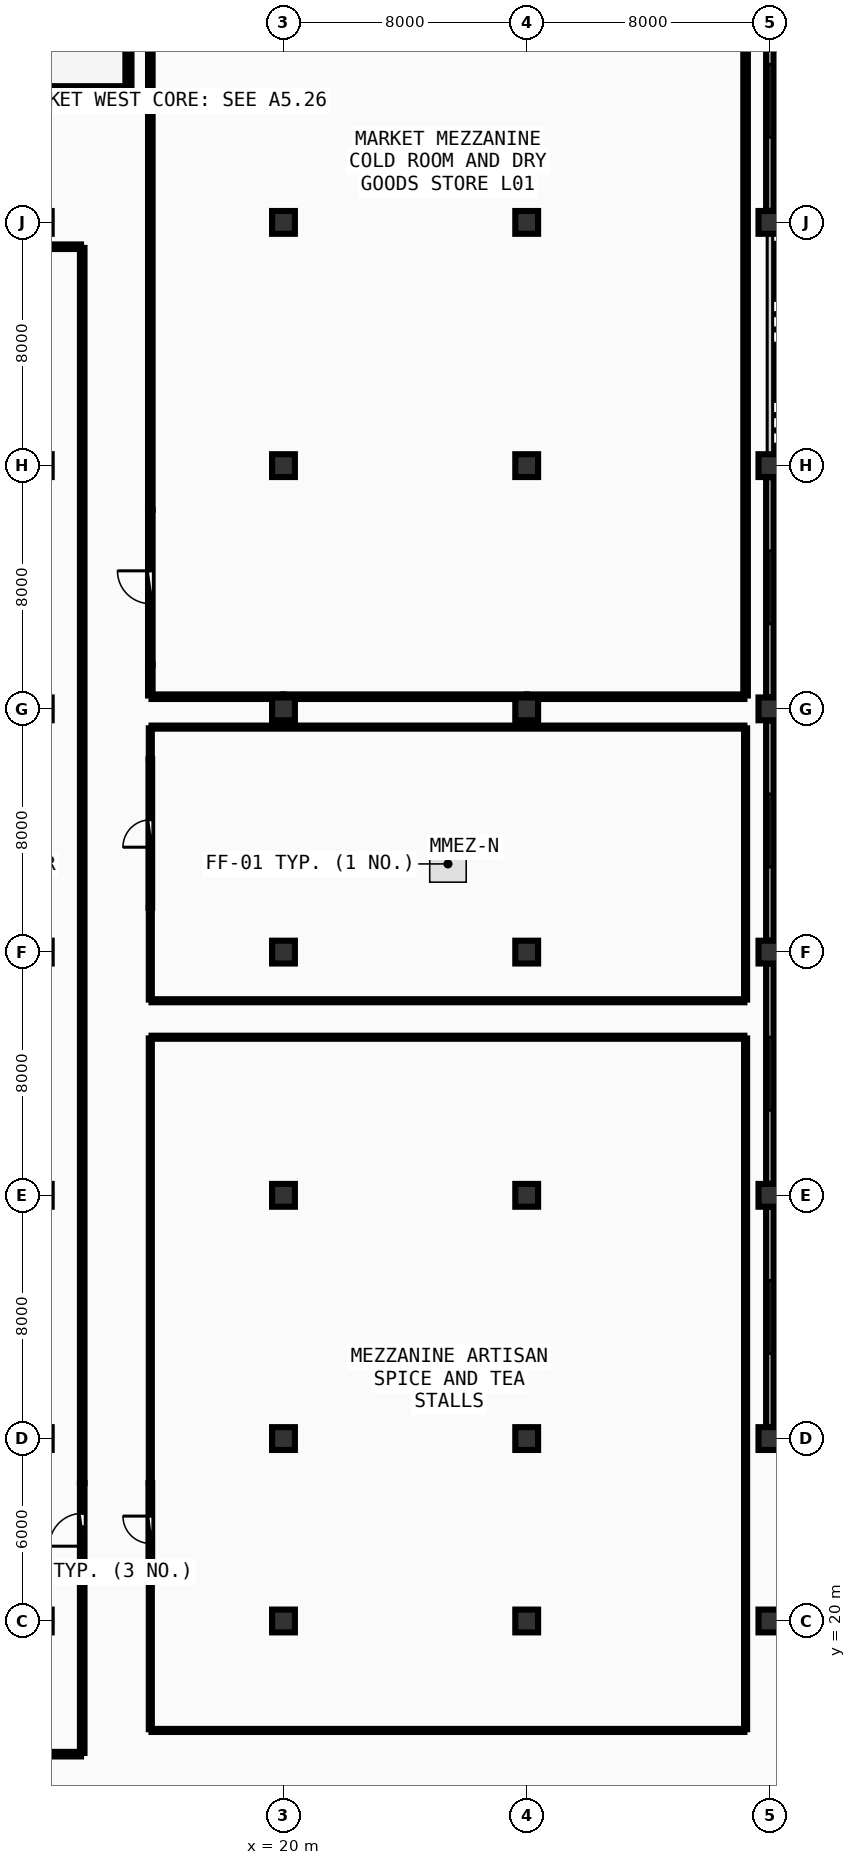
"""IFC4 building model, lengths in metres.
Left out: names, types, materials, properties, quantities, classifications, styles, units other than length and angle.
Written with IfcOpenShell. Run it as: python <this file> out.ifc"""

import sys

from ifc_helpers import new_model, si_unit, direction, frame, frame_2d, origin, origin_2d, place, context, subcontext, project, spatial, rectangle, extrude, element, fill, save


model = new_model("IFC4")
c1 = context("Model", 3, precision=1e-05, world=origin(), true_north=direction((0.0, 1.0)))
c2 = subcontext(c1, "Body", "Model", "MODEL_VIEW")
j1 = project(units=[si_unit("LENGTHUNIT", "METRE"), si_unit("PLANEANGLEUNIT", "RADIAN")], contexts=[c1])
p1 = place(None, origin())
s1 = spatial("IfcSite", under=j1, at=p1, CompositionType="ELEMENT")
p2 = place(p1, origin())
s2 = spatial("IfcBuilding", under=s1, at=p2, CompositionType="ELEMENT")
p3 = place(p2, frame((0.0, 0.0, 4.5)))
s3 = spatial("IfcBuildingStorey", under=s2, at=p3, CompositionType="ELEMENT", Elevation=4.5)
for number, where, z_axis, x_axis in (
    (1, (20.0, 20.0, 0.0), (0.0, 0.0, 1.0), (1.0, 0.0, 0.0)),
    (2, (20.0, 26.0, 0.0), (0.0, 0.0, 1.0), (1.0, 0.0, 0.0)),
    (3, (20.0, 34.0, 0.0), (0.0, 0.0, 1.0), (1.0, 0.0, 0.0)),
    (4, (20.0, 42.0, 0.0), (0.0, 0.0, 1.0), (1.0, 0.0, 0.0)),
    (5, (20.0, 50.0, 0.0), (0.0, 0.0, 1.0), (1.0, 0.0, 0.0)),
    (6, (20.0, 58.0, 0.0), (0.0, 0.0, 1.0), (1.0, 0.0, 0.0)),
    (7, (20.0, 66.0, 0.0), (0.0, 0.0, 1.0), (1.0, 0.0, 0.0)),
    (8, (28.0, 20.0, 0.0), (0.0, 0.0, 1.0), (1.0, 0.0, 0.0)),
    (9, (28.0, 26.0, 0.0), (0.0, 0.0, 1.0), (1.0, 0.0, 0.0)),
    (10, (28.0, 34.0, 0.0), (0.0, 0.0, 1.0), (1.0, 0.0, 0.0)),
    (11, (28.0, 42.0, 0.0), (0.0, 0.0, 1.0), (1.0, 0.0, 0.0)),
    (12, (28.0, 50.0, 0.0), (0.0, 0.0, 1.0), (1.0, 0.0, 0.0)),
    (13, (28.0, 58.0, 0.0), (0.0, 0.0, 1.0), (1.0, 0.0, 0.0)),
    (14, (28.0, 66.0, 0.0), (0.0, 0.0, 1.0), (1.0, 0.0, 0.0)),
    (15, (36.0, 20.0, 0.0), (0.0, 0.0, 1.0), (1.0, 0.0, 0.0)),
    (16, (36.0, 26.0, 0.0), (0.0, 0.0, 1.0), (1.0, 0.0, 0.0)),
    (17, (36.0, 34.0, 0.0), (0.0, 0.0, 1.0), (1.0, 0.0, 0.0)),
    (18, (36.0, 42.0, 0.0), (0.0, 0.0, 1.0), (1.0, 0.0, 0.0)),
    (19, (36.0, 50.0, 0.0), (0.0, 0.0, 1.0), (1.0, 0.0, 0.0)),
    (20, (36.0, 58.0, 0.0), (0.0, 0.0, 1.0), (1.0, 0.0, 0.0)),
    (21, (36.0, 66.0, 0.0), (0.0, 0.0, 1.0), (1.0, 0.0, 0.0)),
):
    element("IfcColumn", number, at=place(p3, frame(where, z_axis=z_axis, x_axis=x_axis)), inside=s3, PredefinedType="COLUMN", context=c2, shape_type="SweptSolid", body=[
        extrude(rectangle(XDim=0.75, YDim=0.75, at=origin_2d()), origin(), (0.0, 0.0, 1.0), 4.5),
    ])
p4 = place(p3, frame((36.0, 26.38, 0.0), z_axis=(0.0, 0.0, 1.0), x_axis=(0.0, 1.0, 0.0)))
e22 = element("IfcWall", 22, at=p4, inside=s3, PredefinedType="SOLIDWALL", context=c2, shape_type="SweptSolid", body=[
    extrude(rectangle(XDim=7.24, YDim=0.25, at=frame_2d((3.62, 0.0))), origin(), (0.0, 0.0, 1.0), 3.42),
])
p5 = place(p4, frame((2.42, 0.0, 0.95)))
e23 = element("IfcOpeningElement", 23, at=p5, cuts=e22, PredefinedType="OPENING", context=c2, shape_type="SweptSolid", body=[
    extrude(rectangle(XDim=2.4, YDim=1.65, at=frame_2d((1.2, 0.825))), frame((0.0, 0.135, 0.0), z_axis=(0.0, -1.0, 0.0), x_axis=(1.0, 0.0, 0.0)), (0.0, 0.0, 1.0), 0.27),
])
p6 = place(p3, frame((36.0, 34.38, 0.0), z_axis=(0.0, 0.0, 1.0), x_axis=(0.0, 1.0, 0.0)))
e24 = element("IfcWall", 24, at=p6, inside=s3, PredefinedType="SOLIDWALL", context=c2, shape_type="SweptSolid", body=[
    extrude(rectangle(XDim=7.24, YDim=0.25, at=frame_2d((3.62, 0.0))), origin(), (0.0, 0.0, 1.0), 3.42),
])
p7 = place(p6, frame((2.42, 0.0, 0.95)))
e25 = element("IfcOpeningElement", 25, at=p7, cuts=e24, PredefinedType="OPENING", context=c2, shape_type="SweptSolid", body=[
    extrude(rectangle(XDim=2.4, YDim=1.65, at=frame_2d((1.2, 0.825))), frame((0.0, 0.135, 0.0), z_axis=(0.0, -1.0, 0.0), x_axis=(1.0, 0.0, 0.0)), (0.0, 0.0, 1.0), 0.27),
])
p8 = place(p3, frame((36.0, 42.38, 0.0), z_axis=(0.0, 0.0, 1.0), x_axis=(0.0, 1.0, 0.0)))
e26 = element("IfcWall", 26, at=p8, inside=s3, PredefinedType="SOLIDWALL", context=c2, shape_type="SweptSolid", body=[
    extrude(rectangle(XDim=7.24, YDim=0.25, at=frame_2d((3.62, 0.0))), origin(), (0.0, 0.0, 1.0), 3.42),
])
p9 = place(p8, frame((2.42, 0.0, 0.95)))
e27 = element("IfcOpeningElement", 27, at=p9, cuts=e26, PredefinedType="OPENING", context=c2, shape_type="SweptSolid", body=[
    extrude(rectangle(XDim=2.4, YDim=1.65, at=frame_2d((1.2, 0.825))), frame((0.0, 0.135, 0.0), z_axis=(0.0, -1.0, 0.0), x_axis=(1.0, 0.0, 0.0)), (0.0, 0.0, 1.0), 0.27),
])
p10 = place(p3, frame((36.0, 50.38, 0.0), z_axis=(0.0, 0.0, 1.0), x_axis=(0.0, 1.0, 0.0)))
e28 = element("IfcWall", 28, at=p10, inside=s3, PredefinedType="SOLIDWALL", context=c2, shape_type="SweptSolid", body=[
    extrude(rectangle(XDim=7.24, YDim=0.25, at=frame_2d((3.62, 0.0))), origin(), (0.0, 0.0, 1.0), 3.42),
])
p11 = place(p10, frame((2.42, 0.0, 0.95)))
e29 = element("IfcOpeningElement", 29, at=p11, cuts=e28, PredefinedType="OPENING", context=c2, shape_type="SweptSolid", body=[
    extrude(rectangle(XDim=2.4, YDim=1.65, at=frame_2d((1.2, 0.825))), frame((0.0, 0.135, 0.0), z_axis=(0.0, -1.0, 0.0), x_axis=(1.0, 0.0, 0.0)), (0.0, 0.0, 1.0), 0.27),
])
p12 = place(p3, frame((36.0, 66.38, 0.0), z_axis=(0.0, 0.0, 1.0), x_axis=(0.0, 1.0, 0.0)))
e30 = element("IfcWall", 30, at=p12, inside=s3, PredefinedType="SOLIDWALL", context=c2, shape_type="SweptSolid", body=[
    extrude(rectangle(XDim=7.24, YDim=0.25, at=frame_2d((3.62, 0.0))), origin(), (0.0, 0.0, 1.0), 3.42),
])
p13 = place(p12, frame((2.42, 0.0, 0.95)))
e31 = element("IfcOpeningElement", 31, at=p13, cuts=e30, PredefinedType="OPENING", context=c2, shape_type="SweptSolid", body=[
    extrude(rectangle(XDim=2.4, YDim=1.65, at=frame_2d((1.2, 0.825))), frame((0.0, 0.135, 0.0), z_axis=(0.0, -1.0, 0.0), x_axis=(1.0, 0.0, 0.0)), (0.0, 0.0, 1.0), 0.27),
])
p14 = place(p3, frame((7.02, 70.38, 0.0), z_axis=(0.0, 0.0, 1.0), x_axis=(1.0, 0.0, 0.0)))
e32 = element("IfcWall", 32, at=p14, inside=s3, PredefinedType="SHEAR", context=c2, shape_type="SweptSolid", body=[
    extrude(rectangle(XDim=7.76, YDim=0.2, at=frame_2d((3.88, 0.0))), origin(), (0.0, 0.0, 1.0), 4.24),
])
p15 = place(p14, frame((0.2, 0.0, 0.0)))
e33 = element("IfcOpeningElement", 33, at=p15, cuts=e32, PredefinedType="OPENING", context=c2, shape_type="SweptSolid", body=[
    extrude(rectangle(XDim=1.05, YDim=2.1, at=frame_2d((0.525, 1.05))), frame((0.0, 0.11, 0.0), z_axis=(0.0, -1.0, 0.0), x_axis=(1.0, 0.0, 0.0)), (0.0, 0.0, 1.0), 0.22),
])
p16 = place(p3, frame((14.9, 70.5, 0.0), z_axis=(0.0, 0.0, 1.0), x_axis=(0.0, 1.0, 0.0)))
e34 = element("IfcWall", 34, at=p16, inside=s3, PredefinedType="SHEAR", context=c2, shape_type="SweptSolid", body=[
    extrude(rectangle(XDim=3.47, YDim=0.2, at=frame_2d((1.735, 0.0))), origin(), (0.0, 0.0, 1.0), 4.24),
])
p17 = place(p3, frame((15.62, 21.46, 0.0), z_axis=(0.0, 0.0, 1.0), x_axis=(0.0, 1.0, 0.0)))
e35 = element("IfcWall", 35, at=p17, inside=s3, PredefinedType="PARTITIONING", context=c2, shape_type="SweptSolid", body=[
    extrude(rectangle(XDim=3.08, YDim=0.12, at=frame_2d((1.54, 0.0))), origin(), (0.0, 0.0, 1.0), 4.19),
])
p18 = place(p17, frame((1.09, 0.0, 0.0)))
e36 = element("IfcOpeningElement", 36, at=p18, cuts=e35, PredefinedType="OPENING", context=c2, shape_type="SweptSolid", body=[
    extrude(rectangle(XDim=0.9, YDim=2.08, at=frame_2d((0.45, 1.04))), frame((0.0, 0.07, 0.0), z_axis=(0.0, -1.0, 0.0), x_axis=(1.0, 0.0, 0.0)), (0.0, 0.0, 1.0), 0.14),
])
p19 = place(p3, frame((15.62, 43.46, 0.0), z_axis=(0.0, 0.0, 1.0), x_axis=(0.0, 1.0, 0.0)))
e37 = element("IfcWall", 37, at=p19, inside=s3, PredefinedType="PARTITIONING", context=c2, shape_type="SweptSolid", body=[
    extrude(rectangle(XDim=4.88, YDim=0.12, at=frame_2d((2.44, 0.0))), origin(), (0.0, 0.0, 1.0), 4.19),
])
p20 = place(p19, frame((1.99, 0.0, 0.0)))
e38 = element("IfcOpeningElement", 38, at=p20, cuts=e37, PredefinedType="OPENING", context=c2, shape_type="SweptSolid", body=[
    extrude(rectangle(XDim=0.9, YDim=2.08, at=frame_2d((0.45, 1.04))), frame((0.0, 0.07, 0.0), z_axis=(0.0, -1.0, 0.0), x_axis=(1.0, 0.0, 0.0)), (0.0, 0.0, 1.0), 0.14),
])
p21 = place(p3, frame((15.62, 51.46, 0.0), z_axis=(0.0, 0.0, 1.0), x_axis=(0.0, 1.0, 0.0)))
e39 = element("IfcWall", 39, at=p21, inside=s3, PredefinedType="PARTITIONING", context=c2, shape_type="SweptSolid", body=[
    extrude(rectangle(XDim=5.08, YDim=0.15, at=frame_2d((2.54, 0.0))), origin(), (0.0, 0.0, 1.0), 4.19),
])
p22 = place(p21, frame((2.0, 0.0, 0.0)))
e40 = element("IfcOpeningElement", 40, at=p22, cuts=e39, PredefinedType="OPENING", context=c2, shape_type="SweptSolid", body=[
    extrude(rectangle(XDim=1.08, YDim=2.1, at=frame_2d((0.54, 1.05))), frame((0.0, 0.085, 0.0), z_axis=(0.0, -1.0, 0.0), x_axis=(1.0, 0.0, 0.0)), (0.0, 0.0, 1.0), 0.17),
])
p23 = place(p3, frame((13.38, 21.46, 0.0), z_axis=(0.0, 0.0, 1.0), x_axis=(0.0, 1.0, 0.0)))
e41 = element("IfcWall", 41, at=p23, inside=s3, PredefinedType="PARTITIONING", context=c2, shape_type="SweptSolid", body=[
    extrude(rectangle(XDim=3.08, YDim=0.15, at=frame_2d((1.54, 0.0))), origin(), (0.0, 0.0, 1.0), 4.19),
])
p24 = place(p23, frame((1.0, 0.0, 0.0)))
e42 = element("IfcOpeningElement", 42, at=p24, cuts=e41, PredefinedType="OPENING", context=c2, shape_type="SweptSolid", body=[
    extrude(rectangle(XDim=1.08, YDim=2.1, at=frame_2d((0.54, 1.05))), frame((0.0, 0.085, 0.0), z_axis=(0.0, -1.0, 0.0), x_axis=(1.0, 0.0, 0.0)), (0.0, 0.0, 1.0), 0.17),
])
p25 = place(p3, frame((15.66, 16.4, 0.0), z_axis=(0.0, 0.0, 1.0), x_axis=(1.0, 0.0, 0.0)))
e43 = element("IfcWall", 43, at=p25, inside=s3, PredefinedType="PARTITIONING", context=c2, shape_type="SweptSolid", body=[
    extrude(rectangle(XDim=19.5, YDim=0.1, at=frame_2d((9.75, 0.0))), origin(), (0.0, 0.0, 1.0), 3.425),
])
p26 = place(p3, frame((35.2, 16.44, 0.0), z_axis=(0.0, 0.0, 1.0), x_axis=(0.0, 1.0, 0.0)))
e44 = element("IfcWall", 44, at=p26, inside=s3, PredefinedType="PARTITIONING", context=c2, shape_type="SweptSolid", body=[
    extrude(rectangle(XDim=22.72, YDim=0.1, at=frame_2d((11.36, 0.0))), origin(), (0.0, 0.0, 1.0), 3.425),
])
p27 = place(p3, frame((35.16, 39.2, 0.0), z_axis=(0.0, 0.0, 1.0), x_axis=(-1.0, 0.0, 0.0)))
e45 = element("IfcWall", 45, at=p27, inside=s3, PredefinedType="PARTITIONING", context=c2, shape_type="SweptSolid", body=[
    extrude(rectangle(XDim=19.5, YDim=0.1, at=frame_2d((9.75, 0.0))), origin(), (0.0, 0.0, 1.0), 3.425),
])
p28 = place(p3, frame((15.62, 39.16, 0.0), z_axis=(0.0, 0.0, 1.0), x_axis=(0.0, -1.0, 0.0)))
e46 = element("IfcWall", 46, at=p28, inside=s3, PredefinedType="PARTITIONING", context=c2, shape_type="SweptSolid", body=[
    extrude(rectangle(XDim=14.62, YDim=0.1, at=frame_2d((7.31, 0.0))), origin(), (0.0, 0.0, 1.0), 3.425),
])
p29 = place(p3, frame((15.62, 21.46, 0.0), z_axis=(0.0, 0.0, 1.0), x_axis=(0.0, -1.0, 0.0)))
e47 = element("IfcWall", 47, at=p29, inside=s3, PredefinedType="PARTITIONING", context=c2, shape_type="SweptSolid", body=[
    extrude(rectangle(XDim=5.02, YDim=0.1, at=frame_2d((2.51, 0.0))), origin(), (0.0, 0.0, 1.0), 3.425),
])
p30 = place(p3, frame((15.66, 40.4, 0.0), z_axis=(0.0, 0.0, 1.0), x_axis=(1.0, 0.0, 0.0)))
e48 = element("IfcWall", 48, at=p30, inside=s3, PredefinedType="PARTITIONING", context=c2, shape_type="SweptSolid", body=[
    extrude(rectangle(XDim=19.5, YDim=0.1, at=frame_2d((9.75, 0.0))), origin(), (0.0, 0.0, 1.0), 3.425),
])
p31 = place(p3, frame((35.2, 40.44, 0.0), z_axis=(0.0, 0.0, 1.0), x_axis=(0.0, 1.0, 0.0)))
e49 = element("IfcWall", 49, at=p31, inside=s3, PredefinedType="PARTITIONING", context=c2, shape_type="SweptSolid", body=[
    extrude(rectangle(XDim=8.92, YDim=0.1, at=frame_2d((4.46, 0.0))), origin(), (0.0, 0.0, 1.0), 3.425),
])
p32 = place(p3, frame((35.16, 49.4, 0.0), z_axis=(0.0, 0.0, 1.0), x_axis=(-1.0, 0.0, 0.0)))
e50 = element("IfcWall", 50, at=p32, inside=s3, PredefinedType="PARTITIONING", context=c2, shape_type="SweptSolid", body=[
    extrude(rectangle(XDim=19.5, YDim=0.1, at=frame_2d((9.75, 0.0))), origin(), (0.0, 0.0, 1.0), 3.425),
])
p33 = place(p3, frame((15.62, 49.36, 0.0), z_axis=(0.0, 0.0, 1.0), x_axis=(0.0, -1.0, 0.0)))
e51 = element("IfcWall", 51, at=p33, inside=s3, PredefinedType="PARTITIONING", context=c2, shape_type="SweptSolid", body=[
    extrude(rectangle(XDim=1.02, YDim=0.1, at=frame_2d((0.51, 0.0))), origin(), (0.0, 0.0, 1.0), 4.19),
])
p34 = place(p3, frame((15.62, 43.46, 0.0), z_axis=(0.0, 0.0, 1.0), x_axis=(0.0, -1.0, 0.0)))
e52 = element("IfcWall", 52, at=p34, inside=s3, PredefinedType="PARTITIONING", context=c2, shape_type="SweptSolid", body=[
    extrude(rectangle(XDim=3.02, YDim=0.1, at=frame_2d((1.51, 0.0))), origin(), (0.0, 0.0, 1.0), 3.425),
])
p35 = place(p3, frame((15.66, 50.4, 0.0), z_axis=(0.0, 0.0, 1.0), x_axis=(1.0, 0.0, 0.0)))
e53 = element("IfcWall", 53, at=p35, inside=s3, PredefinedType="PARTITIONING", context=c2, shape_type="SweptSolid", body=[
    extrude(rectangle(XDim=4.34, YDim=0.15, at=frame_2d((2.17, 0.0))), origin(), (0.0, 0.0, 1.0), 3.425),
])
p36 = place(p3, frame((20.0, 50.4, 0.0), z_axis=(0.0, 0.0, 1.0), x_axis=(1.0, 0.0, 0.0)))
e54 = element("IfcWall", 54, at=p36, inside=s3, PredefinedType="PARTITIONING", context=c2, shape_type="SweptSolid", body=[
    extrude(rectangle(XDim=8.0, YDim=0.15, at=frame_2d((4.0, 0.0))), origin(), (0.0, 0.0, 1.0), 3.425),
])
p37 = place(p3, frame((28.0, 50.4, 0.0), z_axis=(0.0, 0.0, 1.0), x_axis=(1.0, 0.0, 0.0)))
e55 = element("IfcWall", 55, at=p37, inside=s3, PredefinedType="PARTITIONING", context=c2, shape_type="SweptSolid", body=[
    extrude(rectangle(XDim=7.16, YDim=0.15, at=frame_2d((3.58, 0.0))), origin(), (0.0, 0.0, 1.0), 3.425),
])
p38 = place(p3, frame((35.2, 50.44, 0.0), z_axis=(0.0, 0.0, 1.0), x_axis=(0.0, 1.0, 0.0)))
e56 = element("IfcWall", 56, at=p38, inside=s3, PredefinedType="PARTITIONING", context=c2, shape_type="SweptSolid", body=[
    extrude(rectangle(XDim=30.72, YDim=0.15, at=frame_2d((15.36, 0.0))), origin(), (0.0, 0.0, 1.0), 3.425),
])
p39 = place(p3, frame((15.62, 81.16, 0.0), z_axis=(0.0, 0.0, 1.0), x_axis=(0.0, -1.0, 0.0)))
e57 = element("IfcWall", 57, at=p39, inside=s3, PredefinedType="PARTITIONING", context=c2, shape_type="SweptSolid", body=[
    extrude(rectangle(XDim=24.62, YDim=0.15, at=frame_2d((12.31, 0.0))), origin(), (0.0, 0.0, 1.0), 3.425),
])
p40 = place(p3, frame((15.62, 51.46, 0.0), z_axis=(0.0, 0.0, 1.0), x_axis=(0.0, -1.0, 0.0)))
e58 = element("IfcWall", 58, at=p40, inside=s3, PredefinedType="PARTITIONING", context=c2, shape_type="SweptSolid", body=[
    extrude(rectangle(XDim=1.02, YDim=0.15, at=frame_2d((0.51, 0.0))), origin(), (0.0, 0.0, 1.0), 4.19),
])
p41 = place(p3, frame((4.84, 15.62, 0.0), z_axis=(0.0, 0.0, 1.0), x_axis=(1.0, 0.0, 0.0)))
e59 = element("IfcWall", 59, at=p41, inside=s3, PredefinedType="PARTITIONING", context=c2, shape_type="SweptSolid", body=[
    extrude(rectangle(XDim=8.5, YDim=0.15, at=frame_2d((4.25, 0.0))), origin(), (0.0, 0.0, 1.0), 3.425),
])
p42 = place(p3, frame((13.38, 15.66, 0.0), z_axis=(0.0, 0.0, 1.0), x_axis=(0.0, 1.0, 0.0)))
e60 = element("IfcWall", 60, at=p42, inside=s3, PredefinedType="PARTITIONING", context=c2, shape_type="SweptSolid", body=[
    extrude(rectangle(XDim=5.8, YDim=0.15, at=frame_2d((2.9, 0.0))), origin(), (0.0, 0.0, 1.0), 3.425),
])
p43 = place(p3, frame((13.38, 24.54, 0.0), z_axis=(0.0, 0.0, 1.0), x_axis=(0.0, 1.0, 0.0)))
e61 = element("IfcWall", 61, at=p43, inside=s3, PredefinedType="PARTITIONING", context=c2, shape_type="SweptSolid", body=[
    extrude(rectangle(XDim=40.62, YDim=0.15, at=frame_2d((20.31, 0.0))), origin(), (0.0, 0.0, 1.0), 3.425),
])
p44 = place(p3, frame((13.34, 65.2, 0.0), z_axis=(0.0, 0.0, 1.0), x_axis=(-1.0, 0.0, 0.0)))
e62 = element("IfcWall", 62, at=p44, inside=s3, PredefinedType="PARTITIONING", context=c2, shape_type="SweptSolid", body=[
    extrude(rectangle(XDim=8.5, YDim=0.15, at=frame_2d((4.25, 0.0))), origin(), (0.0, 0.0, 1.0), 3.425),
])
p45 = place(p5, origin())
e63 = element("IfcWindow", 63, at=p45, inside=s3, PartitioningType="SINGLE_PANEL", PredefinedType="WINDOW", context=c2, shape_type="SweptSolid", body=[
    extrude(rectangle(XDim=2.4, YDim=1.65, at=frame_2d((1.2, 0.825))), frame((0.0, 0.03, 0.0), z_axis=(0.0, -1.0, 0.0), x_axis=(1.0, 0.0, 0.0)), (0.0, 0.0, 1.0), 0.06),
])
fill(e23, e63)
p46 = place(p7, origin())
e64 = element("IfcWindow", 64, at=p46, inside=s3, PartitioningType="SINGLE_PANEL", PredefinedType="WINDOW", context=c2, shape_type="SweptSolid", body=[
    extrude(rectangle(XDim=2.4, YDim=1.65, at=frame_2d((1.2, 0.825))), frame((0.0, 0.03, 0.0), z_axis=(0.0, -1.0, 0.0), x_axis=(1.0, 0.0, 0.0)), (0.0, 0.0, 1.0), 0.06),
])
fill(e25, e64)
p47 = place(p9, origin())
e65 = element("IfcWindow", 65, at=p47, inside=s3, PartitioningType="SINGLE_PANEL", PredefinedType="WINDOW", context=c2, shape_type="SweptSolid", body=[
    extrude(rectangle(XDim=2.4, YDim=1.65, at=frame_2d((1.2, 0.825))), frame((0.0, 0.03, 0.0), z_axis=(0.0, -1.0, 0.0), x_axis=(1.0, 0.0, 0.0)), (0.0, 0.0, 1.0), 0.06),
])
fill(e27, e65)
p48 = place(p11, origin())
e66 = element("IfcWindow", 66, at=p48, inside=s3, PartitioningType="SINGLE_PANEL", PredefinedType="WINDOW", context=c2, shape_type="SweptSolid", body=[
    extrude(rectangle(XDim=2.4, YDim=1.65, at=frame_2d((1.2, 0.825))), frame((0.0, 0.03, 0.0), z_axis=(0.0, -1.0, 0.0), x_axis=(1.0, 0.0, 0.0)), (0.0, 0.0, 1.0), 0.06),
])
fill(e29, e66)
p49 = place(p13, origin())
e67 = element("IfcWindow", 67, at=p49, inside=s3, PartitioningType="SINGLE_PANEL", PredefinedType="WINDOW", context=c2, shape_type="SweptSolid", body=[
    extrude(rectangle(XDim=2.4, YDim=1.65, at=frame_2d((1.2, 0.825))), frame((0.0, 0.03, 0.0), z_axis=(0.0, -1.0, 0.0), x_axis=(1.0, 0.0, 0.0)), (0.0, 0.0, 1.0), 0.06),
])
fill(e31, e67)
p50 = place(p18, origin())
e68 = element("IfcDoor", 68, at=p50, inside=s3, OperationType="SINGLE_SWING_RIGHT", PredefinedType="DOOR", context=c2, shape_type="SweptSolid", body=[
    extrude(rectangle(XDim=0.9, YDim=2.08, at=frame_2d((0.45, 1.04))), frame((0.0, 0.025, 0.0), z_axis=(0.0, -1.0, 0.0), x_axis=(1.0, 0.0, 0.0)), (0.0, 0.0, 1.0), 0.05),
])
fill(e36, e68)
p51 = place(p20, origin())
e69 = element("IfcDoor", 69, at=p51, inside=s3, OperationType="SINGLE_SWING_LEFT", PredefinedType="DOOR", context=c2, shape_type="SweptSolid", body=[
    extrude(rectangle(XDim=0.9, YDim=2.08, at=frame_2d((0.45, 1.04))), frame((0.0, 0.025, 0.0), z_axis=(0.0, -1.0, 0.0), x_axis=(1.0, 0.0, 0.0)), (0.0, 0.0, 1.0), 0.05),
])
fill(e38, e69)
p52 = place(p22, origin())
e70 = element("IfcDoor", 70, at=p52, inside=s3, OperationType="SINGLE_SWING_RIGHT", PredefinedType="DOOR", context=c2, shape_type="SweptSolid", body=[
    extrude(rectangle(XDim=1.08, YDim=2.1, at=frame_2d((0.54, 1.05))), frame((0.0, 0.025, 0.0), z_axis=(0.0, -1.0, 0.0), x_axis=(1.0, 0.0, 0.0)), (0.0, 0.0, 1.0), 0.05),
])
fill(e40, e70)
p53 = place(p24, origin())
e71 = element("IfcDoor", 71, at=p53, inside=s3, OperationType="SINGLE_SWING_LEFT", PredefinedType="DOOR", context=c2, shape_type="SweptSolid", body=[
    extrude(rectangle(XDim=1.08, YDim=2.1, at=frame_2d((0.54, 1.05))), frame((0.0, 0.025, 0.0), z_axis=(0.0, -1.0, 0.0), x_axis=(1.0, 0.0, 0.0)), (0.0, 0.0, 1.0), 0.05),
])
fill(e42, e71)
save(model, sys.argv[1])
